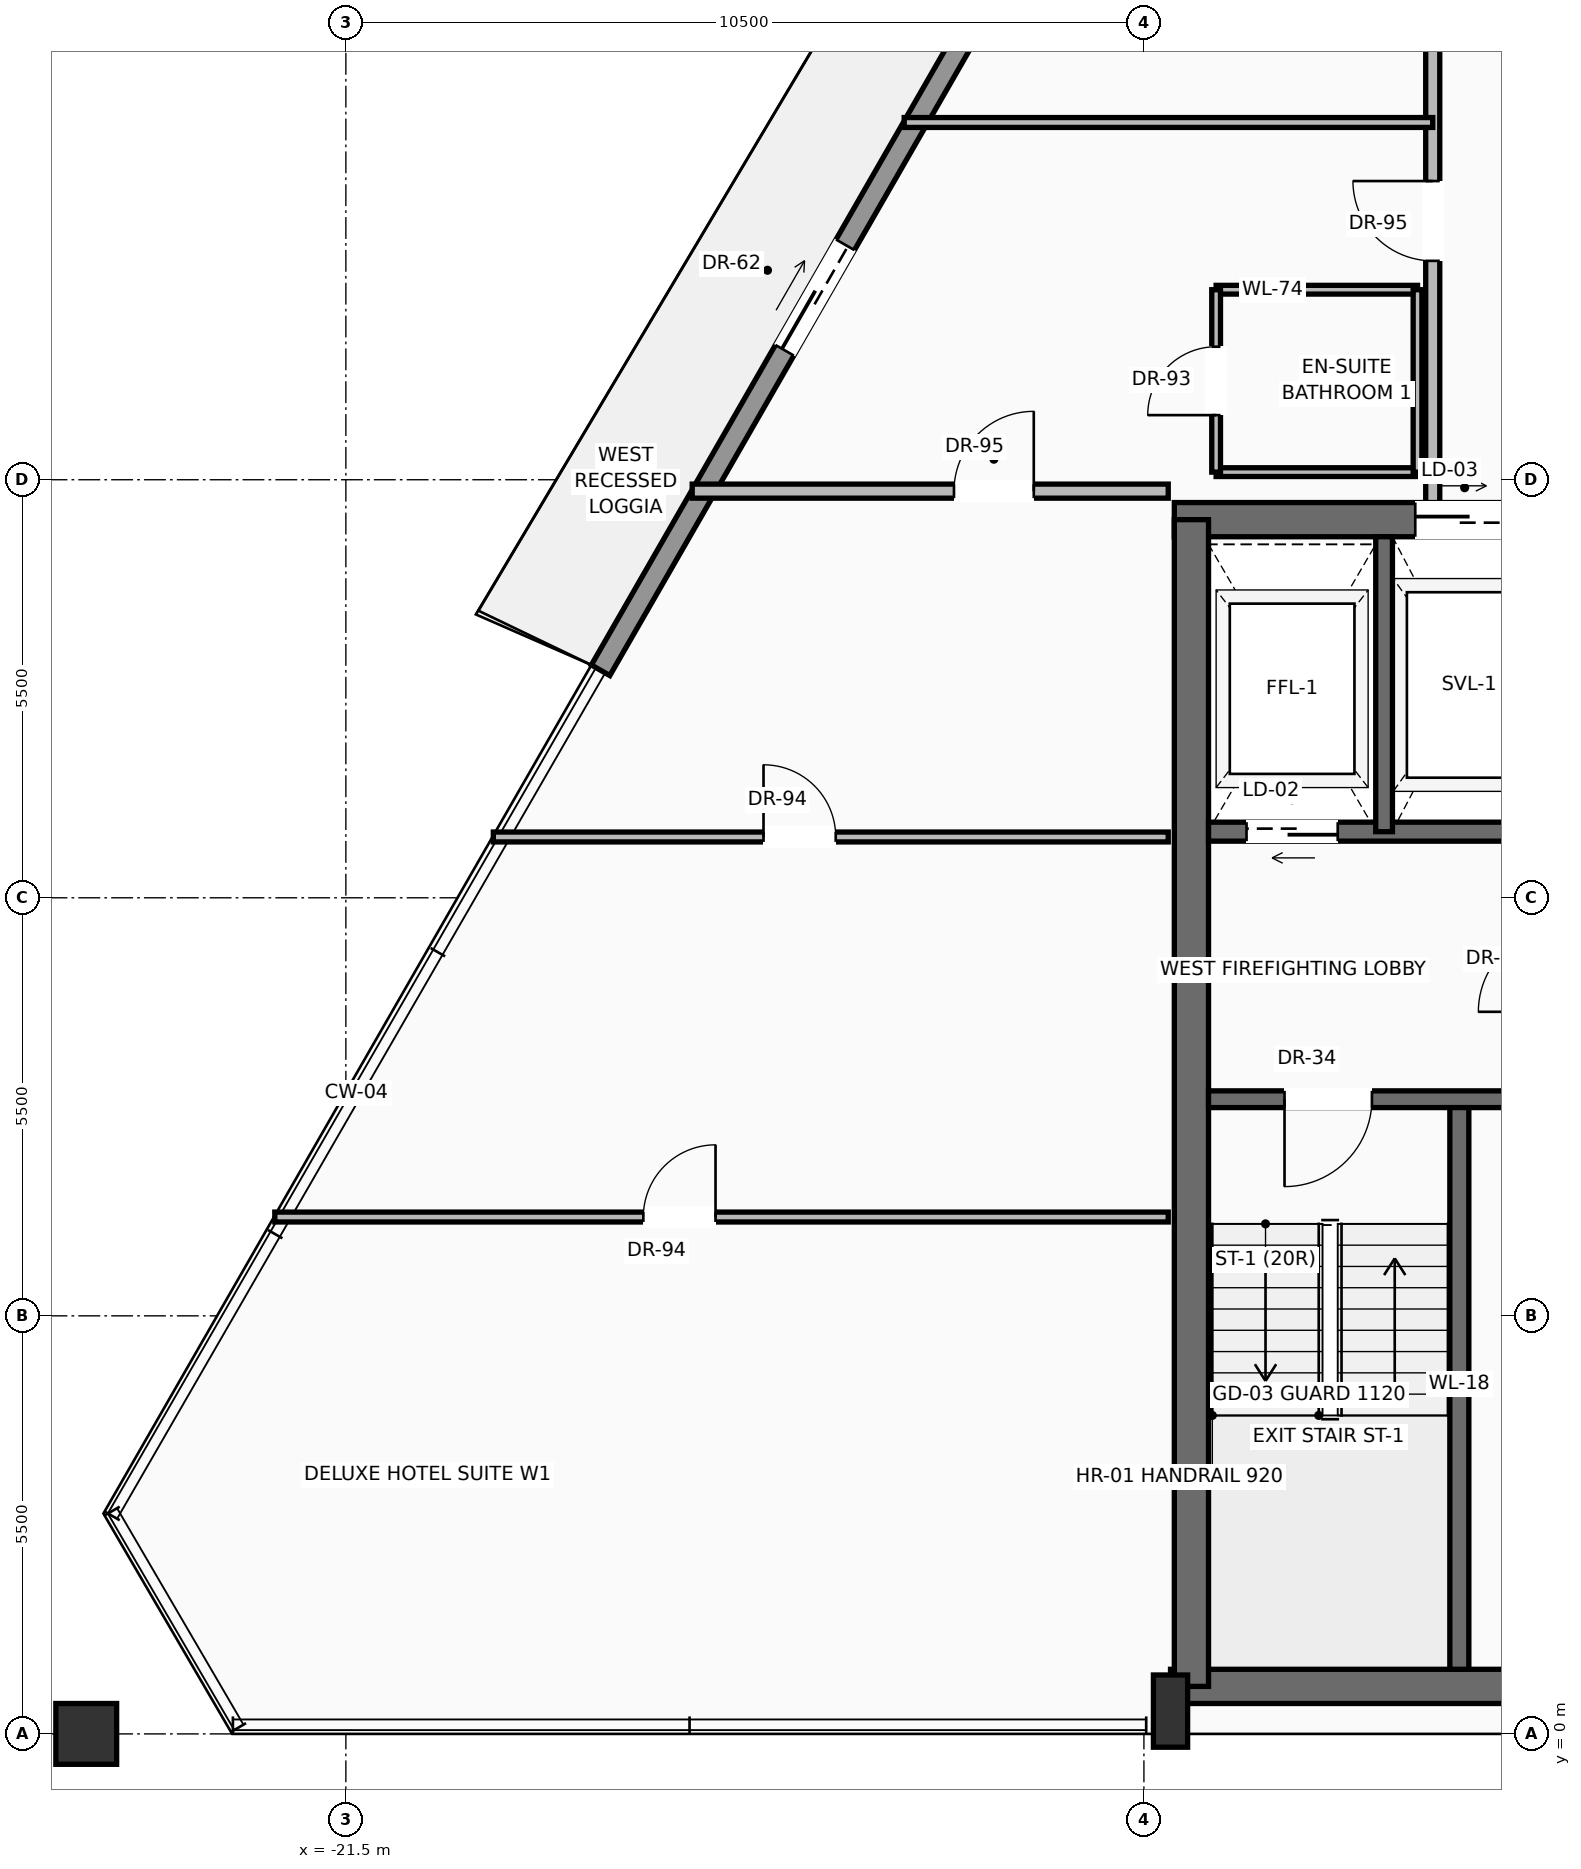
"""IFC4 building model, lengths in metres.
Left out: names, types, materials, properties, quantities, classifications, styles, units other than length and angle.
Written with IfcOpenShell. Run it as: python <this file> out.ifc"""

import sys

from ifc_helpers import new_model, si_unit, direction, frame, frame_2d, origin, origin_2d, place, context, subcontext, project, spatial, rectangle, hollow_rectangle, extrude, source, transform, mapped, element, fill, save


model = new_model("IFC4")
c1 = context("Model", 3, precision=1e-05, world=origin(), true_north=direction((0.0, 1.0)))
c2 = subcontext(c1, "Body", "Model", "MODEL_VIEW")
j1 = project(units=[si_unit("LENGTHUNIT", "METRE"), si_unit("PLANEANGLEUNIT", "RADIAN")], contexts=[c1])
p1 = place(None, origin())
s1 = spatial("IfcSite", under=j1, at=p1, CompositionType="ELEMENT")
p2 = place(p1, origin())
s2 = spatial("IfcBuilding", under=s1, at=p2, CompositionType="ELEMENT")
p3 = place(p2, frame((0.0, 0.0, 286.8)))
s3 = spatial("IfcBuildingStorey", under=s2, at=p3, CompositionType="ELEMENT", Elevation=286.8)
p4 = place(p3, frame((-10.65, 0.625, 0.0), z_axis=(0.0, 0.0, 1.0), x_axis=(1.0, 0.0, 0.0)))
e1 = element("IfcWall", 1, at=p4, inside=s3, PredefinedType="SHEAR", context=c2, shape_type="SweptSolid", body=[
    extrude(rectangle(XDim=21.3, YDim=0.45, at=frame_2d((10.65, 0.0))), origin(), (0.0, 0.0, 1.0), 3.24),
])
p5 = place(p3, frame((-10.6, 15.975, 0.0), z_axis=(0.0, 0.0, 1.0), x_axis=(1.0, 0.0, 0.0)))
e2 = element("IfcWall", 2, at=p5, inside=s3, PredefinedType="SHEAR", context=c2, shape_type="SweptSolid", body=[
    extrude(rectangle(XDim=21.2, YDim=0.45, at=frame_2d((10.6, 0.0))), origin(), (0.0, 0.0, 1.0), 3.24),
])
p6 = place(p5, frame((3.17, 0.0, 0.0)))
e3 = element("IfcOpeningElement", 3, at=p6, cuts=e2, PredefinedType="OPENING", context=c2, shape_type="SweptSolid", body=[
    extrude(rectangle(XDim=1.3, YDim=2.3, at=frame_2d((0.65, 1.15))), frame((0.0, 0.235, 0.0), z_axis=(0.0, -1.0, 0.0), x_axis=(1.0, 0.0, 0.0)), (0.0, 0.0, 1.0), 0.47),
])
p7 = place(p5, frame((9.6, 0.0, 0.0)))
e4 = element("IfcOpeningElement", 4, at=p7, cuts=e2, PredefinedType="OPENING", context=c2, shape_type="SweptSolid", body=[
    extrude(rectangle(XDim=2.0, YDim=2.4, at=frame_2d((1.0, 1.2))), frame((0.0, 0.235, 0.0), z_axis=(0.0, -1.0, 0.0), x_axis=(1.0, 0.0, 0.0)), (0.0, 0.0, 1.0), 0.47),
])
p8 = place(p3, frame((-10.375, 0.625, 0.0), z_axis=(0.0, 0.0, 1.0), x_axis=(0.0, 1.0, 0.0)))
e5 = element("IfcWall", 5, at=p8, inside=s3, PredefinedType="SHEAR", context=c2, shape_type="SweptSolid", body=[
    extrude(rectangle(XDim=15.35, YDim=0.45, at=frame_2d((7.675, 0.0))), origin(), (0.0, 0.0, 1.0), 3.24),
])
m1 = source(origin(), c2, "Body", "SweptSolid", [
    extrude(rectangle(XDim=0.45, YDim=0.95, at=origin_2d()), origin(), (0.0, 0.0, 1.0), 3.45),
])
p9 = place(p3, frame((-10.65, 0.3, 0.0), z_axis=(0.0, 0.0, 1.0), x_axis=(1.0, 0.0, 0.0)))
e6 = element("IfcColumn", 6, at=p9, inside=s3, PredefinedType="PILASTER", context=c2, shape_type="MappedRepresentation", body=[
    mapped(m1, transform((0.0, 0.0, 0.0), scale=1.0)),
])
m2 = source(origin(), c2, "Body", "SweptSolid", [
    extrude(hollow_rectangle(XDim=0.8, YDim=0.8, WallThickness=0.04, at=origin_2d()), origin(), (0.0, 0.0, 1.0), 3.441),
])
p10 = place(p3, frame((-24.916, 0.0, 0.004), z_axis=(0.002412195891, 0.0, 0.999997090651), x_axis=(0.0, 1.0, 0.0)))
e7 = element("IfcColumn", 7, at=p10, inside=s3, PredefinedType="COLUMN", context=c2, shape_type="MappedRepresentation", body=[
    mapped(m2, transform((0.0, 0.0, 0.0), scale=1.0)),
])
m3 = source(origin(), c2, "Body", "SweptSolid", [
    extrude(hollow_rectangle(XDim=0.8, YDim=0.8, WallThickness=0.04, at=origin_2d()), origin(), (0.0, 0.0, 1.0), 3.442),
])
p11 = place(p3, frame((-25.833, 1.518, 0.004), z_axis=(0.013335117304, -0.01624330778, 0.99977914041), x_axis=(0.772903591923, 0.634523472845, 0.0)))
e8 = element("IfcColumn", 8, at=p11, inside=s3, PredefinedType="COLUMN", context=c2, shape_type="MappedRepresentation", body=[
    mapped(m3, transform((0.0, 0.0, 0.0), scale=1.0)),
])
p12 = place(p3, frame((-18.148, 13.993, 0.0), z_axis=(0.0, 0.0, 1.0), x_axis=(0.498516004102, 0.866880495601, 0.0)))
e9 = element("IfcWall", 9, at=p12, inside=s3, PredefinedType="SOLIDWALL", context=c2, shape_type="SweptSolid", body=[
    extrude(rectangle(XDim=20.236, YDim=0.28, at=frame_2d((10.118, 0.0))), origin(), (0.0, 0.0, 1.0), 2.82),
])
p13 = place(p12, frame((4.857, 0.0, 0.0)))
e10 = element("IfcOpeningElement", 10, at=p13, cuts=e9, PredefinedType="OPENING", context=c2, shape_type="SweptSolid", body=[
    extrude(rectangle(XDim=1.6, YDim=2.35, at=frame_2d((0.8, 1.175))), frame((0.0, 0.15, 0.0), z_axis=(0.0, -1.0, 0.0), x_axis=(1.0, 0.0, 0.0)), (0.0, 0.0, 1.0), 0.3),
])
p14 = place(p12, frame((13.761, 0.0, 0.9)))
e11 = element("IfcOpeningElement", 11, at=p14, cuts=e9, PredefinedType="OPENING", context=c2, shape_type="SweptSolid", body=[
    extrude(rectangle(XDim=1.55, YDim=1.75, at=frame_2d((0.775, 0.875))), frame((0.0, 0.15, 0.0), z_axis=(0.0, -1.0, 0.0), x_axis=(1.0, 0.0, 0.0)), (0.0, 0.0, 1.0), 0.3),
])
p15 = place(p3, frame((-6.85, 0.85, 0.0), z_axis=(0.0, 0.0, 1.0), x_axis=(0.0, 1.0, 0.0)))
e12 = element("IfcWall", 12, at=p15, inside=s3, PredefinedType="SOLIDWALL", context=c2, shape_type="SweptSolid", body=[
    extrude(rectangle(XDim=7.5, YDim=0.25, at=frame_2d((3.75, 0.0))), origin(), (0.0, 0.0, 1.0), 3.24),
])
p16 = place(p3, frame((-5.5, 8.35, 0.0), z_axis=(0.0, 0.0, 1.0), x_axis=(-1.0, 0.0, 0.0)))
e13 = element("IfcWall", 13, at=p16, inside=s3, PredefinedType="SOLIDWALL", context=c2, shape_type="SweptSolid", body=[
    extrude(rectangle(XDim=4.65, YDim=0.22, at=frame_2d((2.325, 0.0))), origin(), (0.0, 0.0, 1.0), 3.24),
])
p17 = place(p16, frame((2.5, 0.0, 0.0)))
e14 = element("IfcOpeningElement", 14, at=p17, cuts=e13, PredefinedType="OPENING", context=c2, shape_type="SweptSolid", body=[
    extrude(rectangle(XDim=1.15, YDim=2.2, at=frame_2d((0.575, 1.1))), frame((0.0, 0.12, 0.0), z_axis=(0.0, -1.0, 0.0), x_axis=(1.0, 0.0, 0.0)), (0.0, 0.0, 1.0), 0.24),
])
p18 = place(p3, frame((-5.5, 11.87, 0.0), z_axis=(0.0, 0.0, 1.0), x_axis=(-1.0, 0.0, 0.0)))
e15 = element("IfcWall", 15, at=p18, inside=s3, PredefinedType="SOLIDWALL", context=c2, shape_type="SweptSolid", body=[
    extrude(rectangle(XDim=4.65, YDim=0.25, at=frame_2d((2.325, 0.0))), origin(), (0.0, 0.0, 1.0), 3.24),
])
p19 = place(p18, frame((2.95, 0.0, 0.0)))
e16 = element("IfcOpeningElement", 16, at=p19, cuts=e15, PredefinedType="OPENING", context=c2, shape_type="SweptSolid", body=[
    extrude(rectangle(XDim=1.2, YDim=2.25, at=frame_2d((0.6, 1.125))), frame((0.0, 0.135, 0.0), z_axis=(0.0, -1.0, 0.0), x_axis=(1.0, 0.0, 0.0)), (0.0, 0.0, 1.0), 0.27),
])
p20 = place(p3, frame((-7.84, 11.87, 0.0), z_axis=(0.0, 0.0, 1.0), x_axis=(0.0, 1.0, 0.0)))
e17 = element("IfcWall", 17, at=p20, inside=s3, PredefinedType="SOLIDWALL", context=c2, shape_type="SweptSolid", body=[
    extrude(rectangle(XDim=3.88, YDim=0.22, at=frame_2d((1.94, 0.0))), origin(), (0.0, 0.0, 1.0), 3.24),
])
p21 = place(p3, frame((-7.2, 16.2, 0.0), z_axis=(0.0, 0.0, 1.0), x_axis=(0.0, 1.0, 0.0)))
e18 = element("IfcWall", 18, at=p21, inside=s3, PredefinedType="PARTITIONING", context=c2, shape_type="SweptSolid", body=[
    extrude(rectangle(XDim=10.4, YDim=0.185, at=frame_2d((5.2, 0.0))), origin(), (0.0, 0.0, 1.0), 3.232),
])
p22 = place(p21, frame((3.18, 0.0, 0.0)))
e19 = element("IfcOpeningElement", 19, at=p22, cuts=e18, PredefinedType="OPENING", context=c2, shape_type="SweptSolid", body=[
    extrude(rectangle(XDim=1.05, YDim=2.25, at=frame_2d((0.525, 1.125))), frame((0.0, 0.103, 0.0), z_axis=(0.0, -1.0, 0.0), x_axis=(1.0, 0.0, 0.0)), (0.0, 0.0, 1.0), 0.205),
])
p23 = place(p21, frame((7.712, 0.0, 0.0)))
e20 = element("IfcOpeningElement", 20, at=p23, cuts=e18, PredefinedType="OPENING", context=c2, shape_type="SweptSolid", body=[
    extrude(rectangle(XDim=1.05, YDim=2.25, at=frame_2d((0.525, 1.125))), frame((0.0, 0.103, 0.0), z_axis=(0.0, -1.0, 0.0), x_axis=(1.0, 0.0, 0.0)), (0.0, 0.0, 1.0), 0.205),
])
p24 = place(p3, frame((-16.943, 16.35, 0.0), z_axis=(0.0, 0.0, 1.0), x_axis=(1.0, 0.0, 0.0)))
e21 = element("IfcWall", 21, at=p24, inside=s3, PredefinedType="PARTITIONING", context=c2, shape_type="SweptSolid", body=[
    extrude(rectangle(XDim=6.263, YDim=0.185, at=frame_2d((3.132, 0.0))), origin(), (0.0, 0.0, 1.0), 3.232),
])
p25 = place(p24, frame((3.444, 0.0, 0.0)))
e22 = element("IfcOpeningElement", 22, at=p25, cuts=e21, PredefinedType="OPENING", context=c2, shape_type="SweptSolid", body=[
    extrude(rectangle(XDim=1.05, YDim=2.25, at=frame_2d((0.525, 1.125))), frame((0.0, 0.103, 0.0), z_axis=(0.0, -1.0, 0.0), x_axis=(1.0, 0.0, 0.0)), (0.0, 0.0, 1.0), 0.205),
])
p26 = place(p3, frame((-22.435, 6.8, 0.0), z_axis=(0.0, 0.0, 1.0), x_axis=(1.0, 0.0, 0.0)))
e23 = element("IfcWall", 23, at=p26, inside=s3, PredefinedType="PARTITIONING", context=c2, shape_type="SweptSolid", body=[
    extrude(rectangle(XDim=11.755, YDim=0.13, at=frame_2d((5.877, 0.0))), origin(), (0.0, 0.0, 1.0), 3.232),
])
p27 = place(p26, frame((4.849, 0.0, 0.0)))
e24 = element("IfcOpeningElement", 24, at=p27, cuts=e23, PredefinedType="OPENING", context=c2, shape_type="SweptSolid", body=[
    extrude(rectangle(XDim=0.95, YDim=2.2, at=frame_2d((0.475, 1.1))), frame((0.0, 0.075, 0.0), z_axis=(0.0, -1.0, 0.0), x_axis=(1.0, 0.0, 0.0)), (0.0, 0.0, 1.0), 0.15),
])
p28 = place(p3, frame((-19.56, 11.8, 0.0), z_axis=(0.0, 0.0, 1.0), x_axis=(1.0, 0.0, 0.0)))
e25 = element("IfcWall", 25, at=p28, inside=s3, PredefinedType="PARTITIONING", context=c2, shape_type="SweptSolid", body=[
    extrude(rectangle(XDim=8.88, YDim=0.13, at=frame_2d((4.44, 0.0))), origin(), (0.0, 0.0, 1.0), 3.232),
])
p29 = place(p28, frame((3.555, 0.0, 0.0)))
e26 = element("IfcOpeningElement", 26, at=p29, cuts=e25, PredefinedType="OPENING", context=c2, shape_type="SweptSolid", body=[
    extrude(rectangle(XDim=0.95, YDim=2.2, at=frame_2d((0.475, 1.1))), frame((0.0, 0.075, 0.0), z_axis=(0.0, -1.0, 0.0), x_axis=(1.0, 0.0, 0.0)), (0.0, 0.0, 1.0), 0.15),
])
for number, where, z_axis, x_axis in (
    (27, (-10.05, 16.6, 0.0), (0.0, 0.0, 1.0), (1.0, 0.0, 0.0)),
    (28, (-10.05, 19.0, 0.0), (0.0, 0.0, 1.0), (1.0, 0.0, 0.0)),
):
    element("IfcWall", number, at=place(p3, frame(where, z_axis=z_axis, x_axis=x_axis)), inside=s3, PredefinedType="PARTITIONING", context=c2, shape_type="SweptSolid", body=[
        extrude(rectangle(XDim=2.65, YDim=0.115, at=frame_2d((1.325, 0.0))), origin(), (0.0, 0.0, 1.0), 3.232),
    ])
p30 = place(p3, frame((-10.05, 16.6, 0.0), z_axis=(0.0, 0.0, 1.0), x_axis=(0.0, 1.0, 0.0)))
e29 = element("IfcWall", 29, at=p30, inside=s3, PredefinedType="PARTITIONING", context=c2, shape_type="SweptSolid", body=[
    extrude(rectangle(XDim=2.4, YDim=0.115, at=frame_2d((1.2, 0.0))), origin(), (0.0, 0.0, 1.0), 3.232),
])
p31 = place(p30, frame((0.75, 0.0, 0.0)))
e30 = element("IfcOpeningElement", 30, at=p31, cuts=e29, PredefinedType="OPENING", context=c2, shape_type="SweptSolid", body=[
    extrude(rectangle(XDim=0.9, YDim=2.15, at=frame_2d((0.45, 1.075))), frame((0.0, 0.067, 0.0), z_axis=(0.0, -1.0, 0.0), x_axis=(1.0, 0.0, 0.0)), (0.0, 0.0, 1.0), 0.135),
])
p32 = place(p3, frame((-7.4, 16.6, 0.0), z_axis=(0.0, 0.0, 1.0), x_axis=(0.0, 1.0, 0.0)))
e31 = element("IfcWall", 31, at=p32, inside=s3, PredefinedType="PARTITIONING", context=c2, shape_type="SweptSolid", body=[
    extrude(rectangle(XDim=2.4, YDim=0.115, at=frame_2d((1.2, 0.0))), origin(), (0.0, 0.0, 1.0), 3.232),
])
p33 = place(p3, frame((-14.154, 21.2, 0.0), z_axis=(0.0, 0.0, 1.0), x_axis=(1.0, 0.0, 0.0)))
e32 = element("IfcWall", 32, at=p33, inside=s3, PredefinedType="PARTITIONING", context=c2, shape_type="SweptSolid", body=[
    extrude(rectangle(XDim=6.954, YDim=0.13, at=frame_2d((3.477, 0.0))), origin(), (0.0, 0.0, 1.0), 3.232),
])
m4 = source(origin(), c2, "Body", "SweptSolid", [
    extrude(rectangle(XDim=1.6, YDim=2.35, at=frame_2d((0.8, 1.175))), frame((0.0, 0.025, 0.0), z_axis=(0.0, -1.0, 0.0), x_axis=(1.0, 0.0, 0.0)), (0.0, 0.0, 1.0), 0.05),
])
p34 = place(p13, origin())
e33 = element("IfcDoor", 33, at=p34, inside=s3, OperationType="SLIDING_TO_LEFT", PredefinedType="DOOR", context=c2, shape_type="MappedRepresentation", body=[
    mapped(m4, transform((0.0, 0.0, 0.0), scale=1.0)),
])
fill(e10, e33)
m5 = source(origin(), c2, "Body", "SweptSolid", [
    extrude(rectangle(XDim=1.15, YDim=2.2, at=frame_2d((0.575, 1.1))), frame((0.0, 0.025, 0.0), z_axis=(0.0, -1.0, 0.0), x_axis=(1.0, 0.0, 0.0)), (0.0, 0.0, 1.0), 0.05),
])
p35 = place(p17, origin())
e34 = element("IfcDoor", 34, at=p35, inside=s3, OperationType="SINGLE_SWING_RIGHT", PredefinedType="DOOR", context=c2, shape_type="MappedRepresentation", body=[
    mapped(m5, transform((0.0, 0.0, 0.0), scale=1.0)),
])
fill(e14, e34)
m6 = source(origin(), c2, "Body", "SweptSolid", [
    extrude(rectangle(XDim=1.2, YDim=2.25, at=frame_2d((0.6, 1.125))), frame((0.0, 0.025, 0.0), z_axis=(0.0, -1.0, 0.0), x_axis=(1.0, 0.0, 0.0)), (0.0, 0.0, 1.0), 0.05),
])
p36 = place(p19, origin())
e35 = element("IfcDoor", 35, at=p36, inside=s3, OperationType="SLIDING_TO_LEFT", PredefinedType="DOOR", context=c2, shape_type="MappedRepresentation", body=[
    mapped(m6, transform((0.0, 0.0, 0.0), scale=1.0)),
])
fill(e16, e35)
m7 = source(origin(), c2, "Body", "SweptSolid", [
    extrude(rectangle(XDim=1.3, YDim=2.3, at=frame_2d((0.65, 1.15))), frame((0.0, 0.025, 0.0), z_axis=(0.0, -1.0, 0.0), x_axis=(1.0, 0.0, 0.0)), (0.0, 0.0, 1.0), 0.05),
])
p37 = place(p6, origin())
e36 = element("IfcDoor", 36, at=p37, inside=s3, OperationType="SLIDING_TO_RIGHT", PredefinedType="DOOR", context=c2, shape_type="MappedRepresentation", body=[
    mapped(m7, transform((0.0, 0.0, 0.0), scale=1.0)),
])
fill(e3, e36)
m8 = source(origin(), c2, "Body", "SweptSolid", [
    extrude(rectangle(XDim=1.05, YDim=2.25, at=frame_2d((0.525, 1.125))), frame((0.0, 0.025, 0.0), z_axis=(0.0, -1.0, 0.0), x_axis=(1.0, 0.0, 0.0)), (0.0, 0.0, 1.0), 0.05),
])
p38 = place(p25, origin())
e37 = element("IfcDoor", 37, at=p38, inside=s3, OperationType="SINGLE_SWING_RIGHT", PredefinedType="DOOR", context=c2, shape_type="MappedRepresentation", body=[
    mapped(m8, transform((0.0, 0.0, 0.0), scale=1.0)),
])
fill(e22, e37)
m9 = source(origin(), c2, "Body", "SweptSolid", [
    extrude(rectangle(XDim=0.95, YDim=2.2, at=frame_2d((0.475, 1.1))), frame((0.0, 0.025, 0.0), z_axis=(0.0, -1.0, 0.0), x_axis=(1.0, 0.0, 0.0)), (0.0, 0.0, 1.0), 0.05),
])
p39 = place(p27, origin())
e38 = element("IfcDoor", 38, at=p39, inside=s3, OperationType="SINGLE_SWING_RIGHT", PredefinedType="DOOR", context=c2, shape_type="MappedRepresentation", body=[
    mapped(m9, transform((0.0, 0.0, 0.0), scale=1.0)),
])
fill(e24, e38)
p40 = place(p29, origin())
e39 = element("IfcDoor", 39, at=p40, inside=s3, OperationType="SINGLE_SWING_LEFT", PredefinedType="DOOR", context=c2, shape_type="MappedRepresentation", body=[
    mapped(m9, transform((0.0, 0.0, 0.0), scale=1.0)),
])
fill(e26, e39)
p41 = place(p22, origin())
e40 = element("IfcDoor", 40, at=p41, inside=s3, OperationType="SINGLE_SWING_RIGHT", PredefinedType="DOOR", context=c2, shape_type="MappedRepresentation", body=[
    mapped(m8, transform((0.0, 0.0, 0.0), scale=1.0)),
])
fill(e19, e40)
m10 = source(origin(), c2, "Body", "SweptSolid", [
    extrude(rectangle(XDim=0.9, YDim=2.15, at=frame_2d((0.45, 1.075))), frame((0.0, 0.025, 0.0), z_axis=(0.0, -1.0, 0.0), x_axis=(1.0, 0.0, 0.0)), (0.0, 0.0, 1.0), 0.05),
])
p42 = place(p31, origin())
e41 = element("IfcDoor", 41, at=p42, inside=s3, OperationType="SINGLE_SWING_LEFT", PredefinedType="DOOR", context=c2, shape_type="MappedRepresentation", body=[
    mapped(m10, transform((0.0, 0.0, 0.0), scale=1.0)),
])
fill(e30, e41)
save(model, sys.argv[1])
